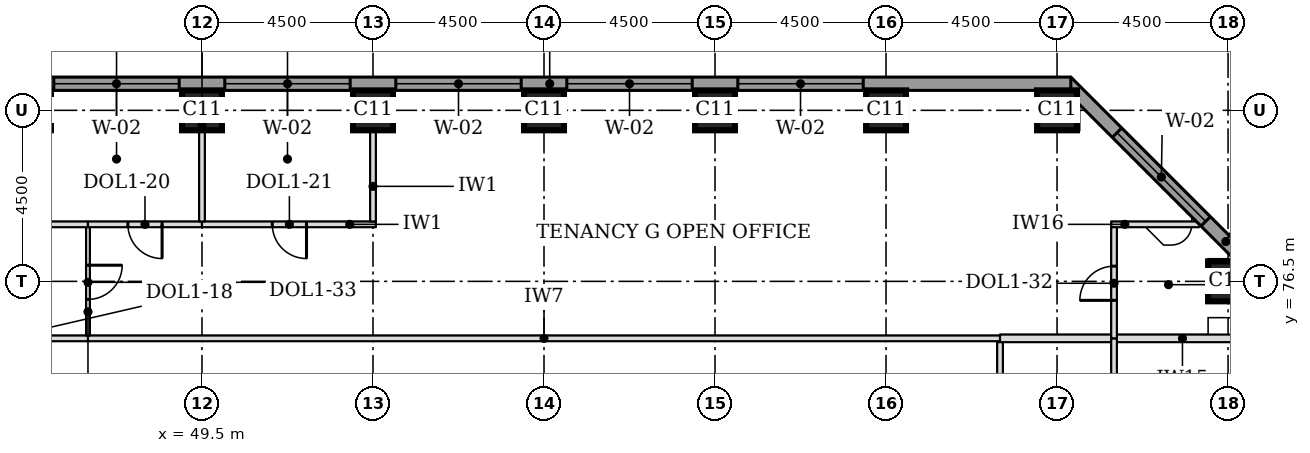
"""IFC4 building model, lengths in metres.
Left out: names, types, materials, properties, quantities, classifications, styles, units other than length and angle.
Written with IfcOpenShell. Run it as: python <this file> out.ifc"""

import sys

from ifc_helpers import new_model, si_unit, direction, frame, frame_2d, origin, origin_2d, place, context, subcontext, project, spatial, rectangle, extrude, element, fill, save


model = new_model("IFC4")
c1 = context("Model", 3, precision=1e-05, world=origin(), true_north=direction((0.0, 1.0)))
c2 = subcontext(c1, "Body", "Model", "MODEL_VIEW")
j1 = project(units=[si_unit("LENGTHUNIT", "METRE"), si_unit("PLANEANGLEUNIT", "RADIAN")], contexts=[c1])
p1 = place(None, origin())
s1 = spatial("IfcSite", under=j1, at=p1, CompositionType="ELEMENT")
p2 = place(p1, origin())
s2 = spatial("IfcBuilding", under=s1, at=p2, CompositionType="ELEMENT")
p3 = place(p2, frame((0.0, 0.0, 78.9)))
s3 = spatial("IfcBuildingStorey", under=s2, at=p3, CompositionType="ELEMENT", Elevation=78.9)
for number, where, z_axis, x_axis in (
    (1, (76.5, 76.5, 0.0), (0.0, 0.0, 1.0), (1.0, 0.0, 0.0)),
    (2, (49.5, 81.0, 0.0), (0.0, 0.0, 1.0), (1.0, 0.0, 0.0)),
    (3, (54.0, 81.0, 0.0), (0.0, 0.0, 1.0), (1.0, 0.0, 0.0)),
    (4, (58.5, 81.0, 0.0), (0.0, 0.0, 1.0), (1.0, 0.0, 0.0)),
    (5, (63.0, 81.0, 0.0), (0.0, 0.0, 1.0), (1.0, 0.0, 0.0)),
    (6, (67.5, 81.0, 0.0), (0.0, 0.0, 1.0), (1.0, 0.0, 0.0)),
    (7, (72.0, 81.0, 0.0), (0.0, 0.0, 1.0), (1.0, 0.0, 0.0)),
):
    element("IfcColumn", number, at=place(p3, frame(where, z_axis=z_axis, x_axis=x_axis)), inside=s3, PredefinedType="COLUMN", context=c2, shape_type="SweptSolid", body=[
        extrude(rectangle(XDim=1.05, YDim=1.05, at=origin_2d()), origin(), (0.0, 0.0, 1.0), 3.7),
    ])
p4 = place(p3, frame((77.251, 76.739, 0.0), z_axis=(0.0, 0.0, 1.0), x_axis=(-0.707106781187, 0.707106781187, 0.0)))
e8 = element("IfcWall", 8, at=p4, inside=s3, PredefinedType="STANDARD", context=c2, shape_type="SweptSolid", body=[
    extrude(rectangle(XDim=7.089, YDim=0.35, at=frame_2d((3.544, 0.0))), origin(), (0.0, 0.0, 1.0), 3.525),
])
p5 = place(p4, frame((1.894, 0.0, 0.9)))
e9 = element("IfcOpeningElement", 9, at=p5, cuts=e8, PredefinedType="OPENING", context=c2, shape_type="SweptSolid", body=[
    extrude(rectangle(XDim=3.3, YDim=1.9, at=frame_2d((1.65, 0.95))), frame((0.0, 0.185, 0.0), z_axis=(0.0, -1.0, 0.0), x_axis=(1.0, 0.0, 0.0)), (0.0, 0.0, 1.0), 0.37),
])
p6 = place(p3, frame((72.362, 81.7, 0.0), z_axis=(0.0, 0.0, 1.0), x_axis=(-1.0, 0.0, 0.0)))
e10 = element("IfcWall", 10, at=p6, inside=s3, PredefinedType="STANDARD", context=c2, shape_type="SweptSolid", body=[
    extrude(rectangle(XDim=32.225, YDim=0.35, at=frame_2d((16.112, 0.0))), origin(), (0.0, 0.0, 1.0), 3.525),
])
p7 = place(p6, frame((5.462, 0.0, 0.9)))
e11 = element("IfcOpeningElement", 11, at=p7, cuts=e10, PredefinedType="OPENING", context=c2, shape_type="SweptSolid", body=[
    extrude(rectangle(XDim=3.3, YDim=1.9, at=frame_2d((1.65, 0.95))), frame((0.0, 0.185, 0.0), z_axis=(0.0, -1.0, 0.0), x_axis=(1.0, 0.0, 0.0)), (0.0, 0.0, 1.0), 0.37),
])
p8 = place(p6, frame((9.962, 0.0, 0.9)))
e12 = element("IfcOpeningElement", 12, at=p8, cuts=e10, PredefinedType="OPENING", context=c2, shape_type="SweptSolid", body=[
    extrude(rectangle(XDim=3.3, YDim=1.9, at=frame_2d((1.65, 0.95))), frame((0.0, 0.185, 0.0), z_axis=(0.0, -1.0, 0.0), x_axis=(1.0, 0.0, 0.0)), (0.0, 0.0, 1.0), 0.37),
])
p9 = place(p6, frame((14.462, 0.0, 0.9)))
e13 = element("IfcOpeningElement", 13, at=p9, cuts=e10, PredefinedType="OPENING", context=c2, shape_type="SweptSolid", body=[
    extrude(rectangle(XDim=3.3, YDim=1.9, at=frame_2d((1.65, 0.95))), frame((0.0, 0.185, 0.0), z_axis=(0.0, -1.0, 0.0), x_axis=(1.0, 0.0, 0.0)), (0.0, 0.0, 1.0), 0.37),
])
p10 = place(p6, frame((18.962, 0.0, 0.9)))
e14 = element("IfcOpeningElement", 14, at=p10, cuts=e10, PredefinedType="OPENING", context=c2, shape_type="SweptSolid", body=[
    extrude(rectangle(XDim=3.3, YDim=1.9, at=frame_2d((1.65, 0.95))), frame((0.0, 0.185, 0.0), z_axis=(0.0, -1.0, 0.0), x_axis=(1.0, 0.0, 0.0)), (0.0, 0.0, 1.0), 0.37),
])
p11 = place(p6, frame((23.462, 0.0, 0.9)))
e15 = element("IfcOpeningElement", 15, at=p11, cuts=e10, PredefinedType="OPENING", context=c2, shape_type="SweptSolid", body=[
    extrude(rectangle(XDim=3.3, YDim=1.9, at=frame_2d((1.65, 0.95))), frame((0.0, 0.185, 0.0), z_axis=(0.0, -1.0, 0.0), x_axis=(1.0, 0.0, 0.0)), (0.0, 0.0, 1.0), 0.37),
])
p12 = place(p3, frame((42.0, 75.0, 0.0), z_axis=(0.0, 0.0, 1.0), x_axis=(1.0, 0.0, 0.0)))
e16 = element("IfcWall", 16, at=p12, inside=s3, PredefinedType="PARTITIONING", context=c2, shape_type="SweptSolid", body=[
    extrude(rectangle(XDim=4.5, YDim=0.15, at=frame_2d((2.25, 0.0))), origin(), (0.0, 0.0, 1.0), 3.55),
])
p13 = place(p12, frame((1.75, 0.0, 0.0)))
e17 = element("IfcOpeningElement", 17, at=p13, cuts=e16, PredefinedType="OPENING", context=c2, shape_type="SweptSolid", body=[
    extrude(rectangle(XDim=1.0, YDim=2.1, at=frame_2d((0.5, 1.05))), frame((0.0, 0.085, 0.0), z_axis=(0.0, -1.0, 0.0), x_axis=(1.0, 0.0, 0.0)), (0.0, 0.0, 1.0), 0.17),
])
p14 = place(p3, frame((46.5, 75.0, 0.0), z_axis=(0.0, 0.0, 1.0), x_axis=(1.0, 0.0, 0.0)))
e18 = element("IfcWall", 18, at=p14, inside=s3, PredefinedType="PARTITIONING", context=c2, shape_type="SweptSolid", body=[
    extrude(rectangle(XDim=24.0, YDim=0.15, at=frame_2d((12.0, 0.0))), origin(), (0.0, 0.0, 1.0), 3.55),
])
p15 = place(p3, frame((70.5, 75.0, 0.0), z_axis=(0.0, 0.0, 1.0), x_axis=(1.0, 0.0, 0.0)))
e19 = element("IfcWall", 19, at=p15, inside=s3, PredefinedType="PARTITIONING", context=c2, shape_type="SweptSolid", body=[
    extrude(rectangle(XDim=2.925, YDim=0.2, at=frame_2d((1.462, 0.0))), origin(), (0.0, 0.0, 1.0), 3.55),
])
p16 = place(p3, frame((73.575, 75.0, 0.0), z_axis=(0.0, 0.0, 1.0), x_axis=(1.0, 0.0, 0.0)))
e20 = element("IfcWall", 20, at=p16, inside=s3, PredefinedType="PARTITIONING", context=c2, shape_type="SweptSolid", body=[
    extrude(rectangle(XDim=3.45, YDim=0.2, at=frame_2d((1.725, 0.0))), origin(), (0.0, 0.0, 1.0), 3.55),
])
p17 = place(p3, frame((45.0, 78.0, 0.0), z_axis=(0.0, 0.0, 1.0), x_axis=(1.0, 0.0, 0.0)))
e21 = element("IfcWall", 21, at=p17, inside=s3, PredefinedType="PARTITIONING", context=c2, shape_type="SweptSolid", body=[
    extrude(rectangle(XDim=1.5, YDim=0.15, at=frame_2d((0.75, 0.0))), origin(), (0.0, 0.0, 1.0), 3.55),
])
p18 = place(p3, frame((46.5, 78.0, 0.0), z_axis=(0.0, 0.0, 1.0), x_axis=(1.0, 0.0, 0.0)))
e22 = element("IfcWall", 22, at=p18, inside=s3, PredefinedType="PARTITIONING", context=c2, shape_type="SweptSolid", body=[
    extrude(rectangle(XDim=3.0, YDim=0.15, at=frame_2d((1.5, 0.0))), origin(), (0.0, 0.0, 1.0), 3.55),
])
p19 = place(p18, frame((1.05, 0.0, 0.0)))
e23 = element("IfcOpeningElement", 23, at=p19, cuts=e22, PredefinedType="OPENING", context=c2, shape_type="SweptSolid", body=[
    extrude(rectangle(XDim=0.9, YDim=2.1, at=frame_2d((0.45, 1.05))), frame((0.0, 0.085, 0.0), z_axis=(0.0, -1.0, 0.0), x_axis=(1.0, 0.0, 0.0)), (0.0, 0.0, 1.0), 0.17),
])
p20 = place(p3, frame((49.5, 78.0, 0.0), z_axis=(0.0, 0.0, 1.0), x_axis=(1.0, 0.0, 0.0)))
e24 = element("IfcWall", 24, at=p20, inside=s3, PredefinedType="PARTITIONING", context=c2, shape_type="SweptSolid", body=[
    extrude(rectangle(XDim=4.575, YDim=0.15, at=frame_2d((2.288, 0.0))), origin(), (0.0, 0.0, 1.0), 3.55),
])
p21 = place(p20, frame((1.85, 0.0, 0.0)))
e25 = element("IfcOpeningElement", 25, at=p21, cuts=e24, PredefinedType="OPENING", context=c2, shape_type="SweptSolid", body=[
    extrude(rectangle(XDim=0.9, YDim=2.1, at=frame_2d((0.45, 1.05))), frame((0.0, 0.085, 0.0), z_axis=(0.0, -1.0, 0.0), x_axis=(1.0, 0.0, 0.0)), (0.0, 0.0, 1.0), 0.17),
])
p22 = place(p3, frame((73.425, 78.0, 0.0), z_axis=(0.0, 0.0, 1.0), x_axis=(1.0, 0.0, 0.0)))
e26 = element("IfcWall", 26, at=p22, inside=s3, PredefinedType="PARTITIONING", context=c2, shape_type="SweptSolid", body=[
    extrude(rectangle(XDim=2.317, YDim=0.15, at=frame_2d((1.159, 0.0))), origin(), (0.0, 0.0, 1.0), 3.55),
])
p23 = place(p3, frame((70.5, 72.0, 0.0), z_axis=(0.0, 0.0, 1.0), x_axis=(0.0, 1.0, 0.0)))
e27 = element("IfcWall", 27, at=p23, inside=s3, PredefinedType="PARTITIONING", context=c2, shape_type="SweptSolid", body=[
    extrude(rectangle(XDim=2.9, YDim=0.15, at=frame_2d((1.45, 0.0))), origin(), (0.0, 0.0, 1.0), 3.55),
])
p24 = place(p3, frame((73.5, 72.075, 0.0), z_axis=(0.0, 0.0, 1.0), x_axis=(0.0, 1.0, 0.0)))
e28 = element("IfcWall", 28, at=p24, inside=s3, PredefinedType="PARTITIONING", context=c2, shape_type="SweptSolid", body=[
    extrude(rectangle(XDim=2.925, YDim=0.15, at=frame_2d((1.462, 0.0))), origin(), (0.0, 0.0, 1.0), 3.55),
])
p25 = place(p3, frame((73.5, 75.0, 0.0), z_axis=(0.0, 0.0, 1.0), x_axis=(0.0, 1.0, 0.0)))
e29 = element("IfcWall", 29, at=p25, inside=s3, PredefinedType="PARTITIONING", context=c2, shape_type="SweptSolid", body=[
    extrude(rectangle(XDim=2.925, YDim=0.15, at=frame_2d((1.462, 0.0))), origin(), (0.0, 0.0, 1.0), 3.55),
])
p26 = place(p25, frame((1.0, 0.0, 0.0)))
e30 = element("IfcOpeningElement", 30, at=p26, cuts=e29, PredefinedType="OPENING", context=c2, shape_type="SweptSolid", body=[
    extrude(rectangle(XDim=0.9, YDim=2.1, at=frame_2d((0.45, 1.05))), frame((0.0, 0.085, 0.0), z_axis=(0.0, -1.0, 0.0), x_axis=(1.0, 0.0, 0.0)), (0.0, 0.0, 1.0), 0.17),
])
p27 = place(p3, frame((46.5, 75.075, 0.0), z_axis=(0.0, 0.0, 1.0), x_axis=(0.0, 1.0, 0.0)))
e31 = element("IfcWall", 31, at=p27, inside=s3, PredefinedType="PARTITIONING", context=c2, shape_type="SweptSolid", body=[
    extrude(rectangle(XDim=2.85, YDim=0.1, at=frame_2d((1.425, 0.0))), origin(), (0.0, 0.0, 1.0), 3.022),
])
p28 = place(p27, frame((0.95, 0.0, 0.0)))
e32 = element("IfcOpeningElement", 32, at=p28, cuts=e31, PredefinedType="OPENING", context=c2, shape_type="SweptSolid", body=[
    extrude(rectangle(XDim=0.9, YDim=2.1, at=frame_2d((0.45, 1.05))), frame((0.0, 0.06, 0.0), z_axis=(0.0, -1.0, 0.0), x_axis=(1.0, 0.0, 0.0)), (0.0, 0.0, 1.0), 0.12),
])
for number, where, z_axis, x_axis in (
    (33, (49.5, 78.075, 0.0), (0.0, 0.0, 1.0), (0.0, 1.0, 0.0)),
    (34, (54.0, 78.075, 0.0), (0.0, 0.0, 1.0), (0.0, 1.0, 0.0)),
):
    element("IfcWall", number, at=place(p3, frame(where, z_axis=z_axis, x_axis=x_axis)), inside=s3, PredefinedType="PARTITIONING", context=c2, shape_type="SweptSolid", body=[
        extrude(rectangle(XDim=3.45, YDim=0.15, at=frame_2d((1.725, 0.0))), origin(), (0.0, 0.0, 1.0), 3.55),
    ])
p29 = place(p5, origin())
e35 = element("IfcWindow", 35, at=p29, inside=s3, PartitioningType="SINGLE_PANEL", PredefinedType="WINDOW", context=c2, shape_type="SweptSolid", body=[
    extrude(rectangle(XDim=3.3, YDim=1.9, at=frame_2d((1.65, 0.95))), frame((0.0, 0.085, 0.0), z_axis=(0.0, -1.0, 0.0), x_axis=(1.0, 0.0, 0.0)), (0.0, 0.0, 1.0), 0.06),
])
fill(e9, e35)
p30 = place(p7, origin())
e36 = element("IfcWindow", 36, at=p30, inside=s3, PartitioningType="SINGLE_PANEL", PredefinedType="WINDOW", context=c2, shape_type="SweptSolid", body=[
    extrude(rectangle(XDim=3.3, YDim=1.9, at=frame_2d((1.65, 0.95))), frame((0.0, 0.085, 0.0), z_axis=(0.0, -1.0, 0.0), x_axis=(1.0, 0.0, 0.0)), (0.0, 0.0, 1.0), 0.06),
])
fill(e11, e36)
p31 = place(p8, origin())
e37 = element("IfcWindow", 37, at=p31, inside=s3, PartitioningType="SINGLE_PANEL", PredefinedType="WINDOW", context=c2, shape_type="SweptSolid", body=[
    extrude(rectangle(XDim=3.3, YDim=1.9, at=frame_2d((1.65, 0.95))), frame((0.0, 0.085, 0.0), z_axis=(0.0, -1.0, 0.0), x_axis=(1.0, 0.0, 0.0)), (0.0, 0.0, 1.0), 0.06),
])
fill(e12, e37)
p32 = place(p9, origin())
e38 = element("IfcWindow", 38, at=p32, inside=s3, PartitioningType="SINGLE_PANEL", PredefinedType="WINDOW", context=c2, shape_type="SweptSolid", body=[
    extrude(rectangle(XDim=3.3, YDim=1.9, at=frame_2d((1.65, 0.95))), frame((0.0, 0.085, 0.0), z_axis=(0.0, -1.0, 0.0), x_axis=(1.0, 0.0, 0.0)), (0.0, 0.0, 1.0), 0.06),
])
fill(e13, e38)
p33 = place(p10, origin())
e39 = element("IfcWindow", 39, at=p33, inside=s3, PartitioningType="SINGLE_PANEL", PredefinedType="WINDOW", context=c2, shape_type="SweptSolid", body=[
    extrude(rectangle(XDim=3.3, YDim=1.9, at=frame_2d((1.65, 0.95))), frame((0.0, 0.085, 0.0), z_axis=(0.0, -1.0, 0.0), x_axis=(1.0, 0.0, 0.0)), (0.0, 0.0, 1.0), 0.06),
])
fill(e14, e39)
p34 = place(p11, origin())
e40 = element("IfcWindow", 40, at=p34, inside=s3, PartitioningType="SINGLE_PANEL", PredefinedType="WINDOW", context=c2, shape_type="SweptSolid", body=[
    extrude(rectangle(XDim=3.3, YDim=1.9, at=frame_2d((1.65, 0.95))), frame((0.0, 0.085, 0.0), z_axis=(0.0, -1.0, 0.0), x_axis=(1.0, 0.0, 0.0)), (0.0, 0.0, 1.0), 0.06),
])
fill(e15, e40)
p35 = place(p28, frame((0.9, 0.0, 0.0), z_axis=(0.0, 0.0, 1.0), x_axis=(-1.0, 0.0, 0.0)))
e41 = element("IfcDoor", 41, at=p35, inside=s3, OperationType="SINGLE_SWING_LEFT", PredefinedType="DOOR", context=c2, shape_type="SweptSolid", body=[
    extrude(rectangle(XDim=0.9, YDim=2.1, at=frame_2d((0.45, 1.05))), frame((0.0, 0.025, 0.0), z_axis=(0.0, -1.0, 0.0), x_axis=(1.0, 0.0, 0.0)), (0.0, 0.0, 1.0), 0.05),
])
fill(e32, e41)
p36 = place(p26, origin())
e42 = element("IfcDoor", 42, at=p36, inside=s3, OperationType="SINGLE_SWING_LEFT", PredefinedType="DOOR", context=c2, shape_type="SweptSolid", body=[
    extrude(rectangle(XDim=0.9, YDim=2.1, at=frame_2d((0.45, 1.05))), frame((0.0, 0.025, 0.0), z_axis=(0.0, -1.0, 0.0), x_axis=(1.0, 0.0, 0.0)), (0.0, 0.0, 1.0), 0.05),
])
fill(e30, e42)
p37 = place(p19, frame((0.9, 0.0, 0.0), z_axis=(0.0, 0.0, 1.0), x_axis=(-1.0, 0.0, 0.0)))
e43 = element("IfcDoor", 43, at=p37, inside=s3, OperationType="SINGLE_SWING_LEFT", PredefinedType="DOOR", context=c2, shape_type="SweptSolid", body=[
    extrude(rectangle(XDim=0.9, YDim=2.1, at=frame_2d((0.45, 1.05))), frame((0.0, 0.025, 0.0), z_axis=(0.0, -1.0, 0.0), x_axis=(1.0, 0.0, 0.0)), (0.0, 0.0, 1.0), 0.05),
])
fill(e23, e43)
p38 = place(p21, frame((0.9, 0.0, 0.0), z_axis=(0.0, 0.0, 1.0), x_axis=(-1.0, 0.0, 0.0)))
e44 = element("IfcDoor", 44, at=p38, inside=s3, OperationType="SINGLE_SWING_LEFT", PredefinedType="DOOR", context=c2, shape_type="SweptSolid", body=[
    extrude(rectangle(XDim=0.9, YDim=2.1, at=frame_2d((0.45, 1.05))), frame((0.0, 0.025, 0.0), z_axis=(0.0, -1.0, 0.0), x_axis=(1.0, 0.0, 0.0)), (0.0, 0.0, 1.0), 0.05),
])
fill(e25, e44)
save(model, sys.argv[1])
